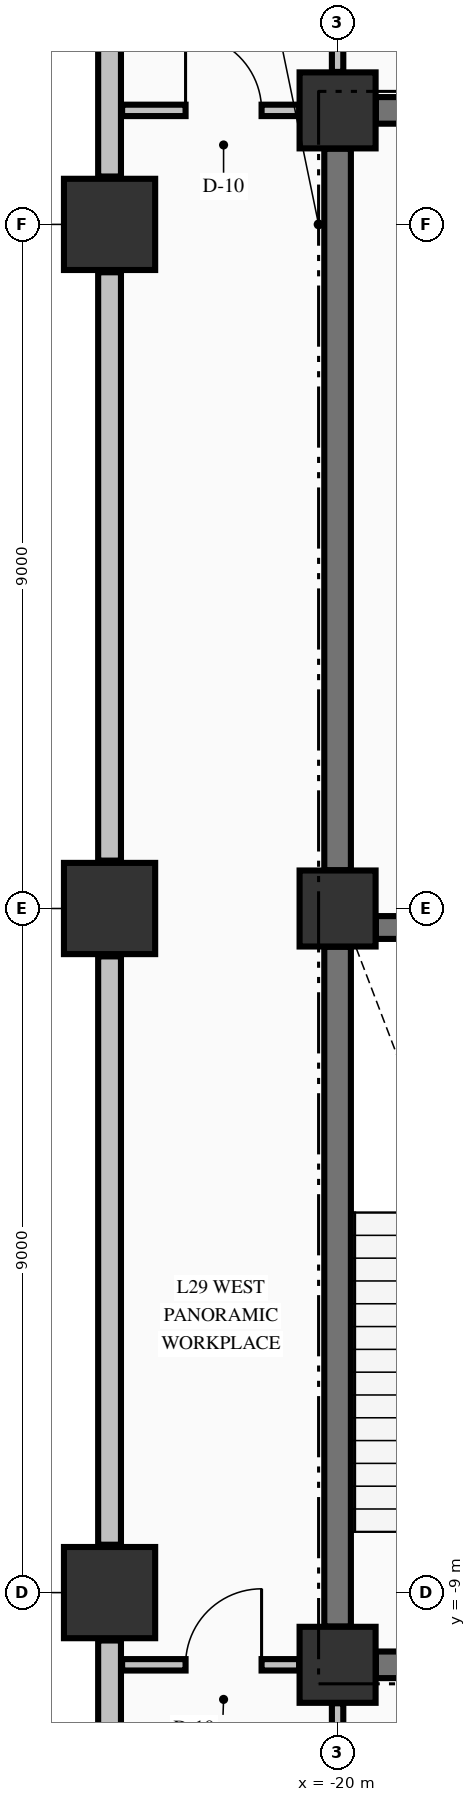
"""IFC4 building model, lengths in metres.
Left out: names, types, materials, properties, quantities, classifications, styles, units other than length and angle.
Written with IfcOpenShell. Run it as: python <this file> out.ifc"""

import sys

from ifc_helpers import new_model, si_unit, direction, frame, frame_2d, origin, origin_2d, place, context, subcontext, project, spatial, rectangle, extrude, element, fill, save


model = new_model("IFC4")
c1 = context("Model", 3, precision=1e-05, world=origin(), true_north=direction((0.0, 1.0)))
c2 = subcontext(c1, "Body", "Model", "MODEL_VIEW")
j1 = project(units=[si_unit("LENGTHUNIT", "METRE"), si_unit("PLANEANGLEUNIT", "RADIAN")], contexts=[c1])
p1 = place(None, origin())
s1 = spatial("IfcSite", under=j1, at=p1, CompositionType="ELEMENT")
p2 = place(p1, origin())
s2 = spatial("IfcBuilding", under=s1, at=p2, CompositionType="ELEMENT")
p3 = place(p2, frame((0.0, 0.0, 116.35)))
s3 = spatial("IfcBuildingStorey", under=s2, at=p3, CompositionType="ELEMENT", Elevation=116.35)
for number, where, z_axis, x_axis in (
    (1, (-23.0, -9.0, -0.425), (0.0, 0.0, 1.0), (1.0, 0.0, 0.0)),
    (2, (-23.0, 0.0, -0.425), (0.0, 0.0, 1.0), (1.0, 0.0, 0.0)),
    (3, (-23.0, 9.0, -0.425), (0.0, 0.0, 1.0), (1.0, 0.0, 0.0)),
):
    element("IfcColumn", number, at=place(p3, frame(where, z_axis=z_axis, x_axis=x_axis)), inside=s3, PredefinedType="COLUMN", context=c2, shape_type="SweptSolid", body=[
        extrude(rectangle(XDim=1.2, YDim=1.2, at=origin_2d()), origin(), (0.0, 0.0, 1.0), 5.0),
    ])
for number, where, z_axis, x_axis in (
    (4, (-20.0, -9.95, -0.425), (0.0, 0.0, 1.0), (1.0, 0.0, 0.0)),
    (5, (-20.0, 10.5, -0.425), (0.0, 0.0, 1.0), (1.0, 0.0, 0.0)),
    (6, (-20.0, 0.0, -0.425), (0.0, 0.0, 1.0), (1.0, 0.0, 0.0)),
):
    element("IfcColumn", number, at=place(p3, frame(where, z_axis=z_axis, x_axis=x_axis)), inside=s3, PredefinedType="COLUMN", context=c2, shape_type="SweptSolid", body=[
        extrude(rectangle(XDim=1.0, YDim=1.0, at=origin_2d()), origin(), (0.0, 0.0, 1.0), 5.0),
    ])
p4 = place(p3, frame((-23.0, -9.63, 0.0), z_axis=(0.0, 0.0, 1.0), x_axis=(0.0, -1.0, 0.0)))
e7 = element("IfcWall", 7, at=p4, inside=s3, PredefinedType="STANDARD", context=c2, shape_type="SweptSolid", body=[
    extrude(rectangle(XDim=10.74, YDim=0.3, at=frame_2d((5.37, 0.0))), origin(), (0.0, 0.0, 1.0), 2.167),
])
for number, where, z_axis, x_axis in (
    (8, (-23.0, -0.63, 0.0), (0.0, 0.0, 1.0), (0.0, -1.0, 0.0)),
    (9, (-23.0, 8.37, 0.0), (0.0, 0.0, 1.0), (0.0, -1.0, 0.0)),
):
    element("IfcWall", number, at=place(p3, frame(where, z_axis=z_axis, x_axis=x_axis)), inside=s3, PredefinedType="STANDARD", context=c2, shape_type="SweptSolid", body=[
        extrude(rectangle(XDim=7.74, YDim=0.3, at=frame_2d((3.87, 0.0))), origin(), (0.0, 0.0, 1.0), 2.167),
    ])
p5 = place(p3, frame((-23.0, 20.37, 0.0), z_axis=(0.0, 0.0, 1.0), x_axis=(0.0, -1.0, 0.0)))
e10 = element("IfcWall", 10, at=p5, inside=s3, PredefinedType="STANDARD", context=c2, shape_type="SweptSolid", body=[
    extrude(rectangle(XDim=10.74, YDim=0.3, at=frame_2d((5.37, 0.0))), origin(), (0.0, 0.0, 1.0), 2.167),
])
p6 = place(p3, frame((-19.496, -9.95, 0.0), z_axis=(0.0, 0.0, 1.0), x_axis=(1.0, 0.0, 0.0)))
e11 = element("IfcWall", 11, at=p6, inside=s3, PredefinedType="SHEAR", context=c2, shape_type="SweptSolid", body=[
    extrude(rectangle(XDim=4.796, YDim=0.35, at=frame_2d((2.398, 0.0))), origin(), (0.0, 0.0, 1.0), 4.575),
])
p7 = place(p6, frame((0.671, 0.0, 0.0)))
e12 = element("IfcOpeningElement", 12, at=p7, cuts=e11, PredefinedType="OPENING", context=c2, shape_type="SweptSolid", body=[
    extrude(rectangle(XDim=1.05, YDim=2.15, at=frame_2d((0.525, 1.075))), frame((0.0, 0.185, 0.0), z_axis=(0.0, -1.0, 0.0), x_axis=(1.0, 0.0, 0.0)), (0.0, 0.0, 1.0), 0.37),
])
p8 = place(p3, frame((-19.496, -0.25, 0.0), z_axis=(0.0, 0.0, 1.0), x_axis=(1.0, 0.0, 0.0)))
e13 = element("IfcWall", 13, at=p8, inside=s3, PredefinedType="SHEAR", context=c2, shape_type="SweptSolid", body=[
    extrude(rectangle(XDim=7.992, YDim=0.3, at=frame_2d((3.996, 0.0))), origin(), (0.0, 0.0, 1.0), 4.575),
])
p9 = place(p8, frame((5.796, 0.0, 0.0)))
e14 = element("IfcOpeningElement", 14, at=p9, cuts=e13, PredefinedType="OPENING", context=c2, shape_type="SweptSolid", body=[
    extrude(rectangle(XDim=1.1, YDim=2.15, at=frame_2d((0.55, 1.075))), frame((0.0, 0.16, 0.0), z_axis=(0.0, -1.0, 0.0), x_axis=(1.0, 0.0, 0.0)), (0.0, 0.0, 1.0), 0.32),
])
p10 = place(p3, frame((-19.496, 10.5, 0.0), z_axis=(0.0, 0.0, 1.0), x_axis=(1.0, 0.0, 0.0)))
e15 = element("IfcWall", 15, at=p10, inside=s3, PredefinedType="SHEAR", context=c2, shape_type="SweptSolid", body=[
    extrude(rectangle(XDim=4.796, YDim=0.35, at=frame_2d((2.398, 0.0))), origin(), (0.0, 0.0, 1.0), 4.575),
])
p11 = place(p10, frame((0.646, 0.0, 0.0)))
e16 = element("IfcOpeningElement", 16, at=p11, cuts=e15, PredefinedType="OPENING", context=c2, shape_type="SweptSolid", body=[
    extrude(rectangle(XDim=0.9, YDim=2.15, at=frame_2d((0.45, 1.075))), frame((0.0, 0.185, 0.0), z_axis=(0.0, -1.0, 0.0), x_axis=(1.0, 0.0, 0.0)), (0.0, 0.0, 1.0), 0.37),
])
p12 = place(p10, frame((3.271, 0.0, 0.0)))
e17 = element("IfcOpeningElement", 17, at=p12, cuts=e15, PredefinedType="OPENING", context=c2, shape_type="SweptSolid", body=[
    extrude(rectangle(XDim=0.95, YDim=2.15, at=frame_2d((0.475, 1.075))), frame((0.0, 0.185, 0.0), z_axis=(0.0, -1.0, 0.0), x_axis=(1.0, 0.0, 0.0)), (0.0, 0.0, 1.0), 0.37),
])
p13 = place(p3, frame((-22.835, -9.95, 0.0), z_axis=(0.0, 0.0, 1.0), x_axis=(1.0, 0.0, 0.0)))
e18 = element("IfcWall", 18, at=p13, inside=s3, PredefinedType="PARTITIONING", context=c2, shape_type="SweptSolid", body=[
    extrude(rectangle(XDim=2.329, YDim=0.15, at=frame_2d((1.165, 0.0))), origin(), (0.0, 0.0, 1.0), 4.575),
])
p14 = place(p13, frame((0.835, 0.0, 0.0)))
e19 = element("IfcOpeningElement", 19, at=p14, cuts=e18, PredefinedType="OPENING", context=c2, shape_type="SweptSolid", body=[
    extrude(rectangle(XDim=1.0, YDim=2.15, at=frame_2d((0.5, 1.075))), frame((0.0, 0.085, 0.0), z_axis=(0.0, -1.0, 0.0), x_axis=(1.0, 0.0, 0.0)), (0.0, 0.0, 1.0), 0.17),
])
p15 = place(p3, frame((-22.835, 10.5, 0.0), z_axis=(0.0, 0.0, 1.0), x_axis=(1.0, 0.0, 0.0)))
e20 = element("IfcWall", 20, at=p15, inside=s3, PredefinedType="PARTITIONING", context=c2, shape_type="SweptSolid", body=[
    extrude(rectangle(XDim=2.329, YDim=0.15, at=frame_2d((1.165, 0.0))), origin(), (0.0, 0.0, 1.0), 4.575),
])
p16 = place(p15, frame((0.835, 0.0, 0.0)))
e21 = element("IfcOpeningElement", 21, at=p16, cuts=e20, PredefinedType="OPENING", context=c2, shape_type="SweptSolid", body=[
    extrude(rectangle(XDim=1.0, YDim=2.15, at=frame_2d((0.5, 1.075))), frame((0.0, 0.085, 0.0), z_axis=(0.0, -1.0, 0.0), x_axis=(1.0, 0.0, 0.0)), (0.0, 0.0, 1.0), 0.17),
])
p17 = place(p3, frame((-20.0, -9.446, 0.0), z_axis=(0.0, 0.0, 1.0), x_axis=(0.0, 1.0, 0.0)))
e22 = element("IfcWall", 22, at=p17, inside=s3, PredefinedType="SHEAR", context=c2, shape_type="SweptSolid", body=[
    extrude(rectangle(XDim=8.942, YDim=0.35, at=frame_2d((4.471, 0.0))), origin(), (0.0, 0.0, 1.0), 4.575),
])
p18 = place(p3, frame((-20.0, 0.504, 0.0), z_axis=(0.0, 0.0, 1.0), x_axis=(0.0, 1.0, 0.0)))
e23 = element("IfcWall", 23, at=p18, inside=s3, PredefinedType="SHEAR", context=c2, shape_type="SweptSolid", body=[
    extrude(rectangle(XDim=9.492, YDim=0.35, at=frame_2d((4.746, 0.0))), origin(), (0.0, 0.0, 1.0), 4.575),
])
p19 = place(p3, frame((-20.0, -12.722, 0.0), z_axis=(0.0, 0.0, 1.0), x_axis=(0.0, 1.0, 0.0)))
e24 = element("IfcWall", 24, at=p19, inside=s3, PredefinedType="PARTITIONING", context=c2, shape_type="SweptSolid", body=[
    extrude(rectangle(XDim=2.266, YDim=0.15, at=frame_2d((1.133, 0.0))), origin(), (0.0, 0.0, 1.0), 4.065),
])
p20 = place(p19, frame((0.867, 0.0, 0.0)))
e25 = element("IfcOpeningElement", 25, at=p20, cuts=e24, PredefinedType="OPENING", context=c2, shape_type="SweptSolid", body=[
    extrude(rectangle(XDim=0.95, YDim=2.02, at=frame_2d((0.475, 1.01))), frame((0.0, 0.085, 0.0), z_axis=(0.0, -1.0, 0.0), x_axis=(1.0, 0.0, 0.0)), (0.0, 0.0, 1.0), 0.17),
])
p21 = place(p3, frame((-20.0, 11.006, 0.0), z_axis=(0.0, 0.0, 1.0), x_axis=(0.0, 1.0, 0.0)))
e26 = element("IfcWall", 26, at=p21, inside=s3, PredefinedType="PARTITIONING", context=c2, shape_type="SweptSolid", body=[
    extrude(rectangle(XDim=2.266, YDim=0.15, at=frame_2d((1.133, 0.0))), origin(), (0.0, 0.0, 1.0), 4.065),
])
p22 = place(p21, frame((0.449, 0.0, 0.0)))
e27 = element("IfcOpeningElement", 27, at=p22, cuts=e26, PredefinedType="OPENING", context=c2, shape_type="SweptSolid", body=[
    extrude(rectangle(XDim=0.95, YDim=2.02, at=frame_2d((0.475, 1.01))), frame((0.0, 0.085, 0.0), z_axis=(0.0, -1.0, 0.0), x_axis=(1.0, 0.0, 0.0)), (0.0, 0.0, 1.0), 0.17),
])
p23 = place(p16, origin())
e28 = element("IfcDoor", 28, at=p23, inside=s3, OperationType="SINGLE_SWING_LEFT", PredefinedType="DOOR", context=c2, shape_type="SweptSolid", body=[
    extrude(rectangle(XDim=1.0, YDim=2.15, at=frame_2d((0.5, 1.075))), frame((0.0, 0.025, 0.0), z_axis=(0.0, -1.0, 0.0), x_axis=(1.0, 0.0, 0.0)), (0.0, 0.0, 1.0), 0.05),
])
fill(e21, e28)
p24 = place(p14, origin())
e29 = element("IfcDoor", 29, at=p24, inside=s3, OperationType="SINGLE_SWING_RIGHT", PredefinedType="DOOR", context=c2, shape_type="SweptSolid", body=[
    extrude(rectangle(XDim=1.0, YDim=2.15, at=frame_2d((0.5, 1.075))), frame((0.0, 0.025, 0.0), z_axis=(0.0, -1.0, 0.0), x_axis=(1.0, 0.0, 0.0)), (0.0, 0.0, 1.0), 0.05),
])
fill(e19, e29)
save(model, sys.argv[1])
